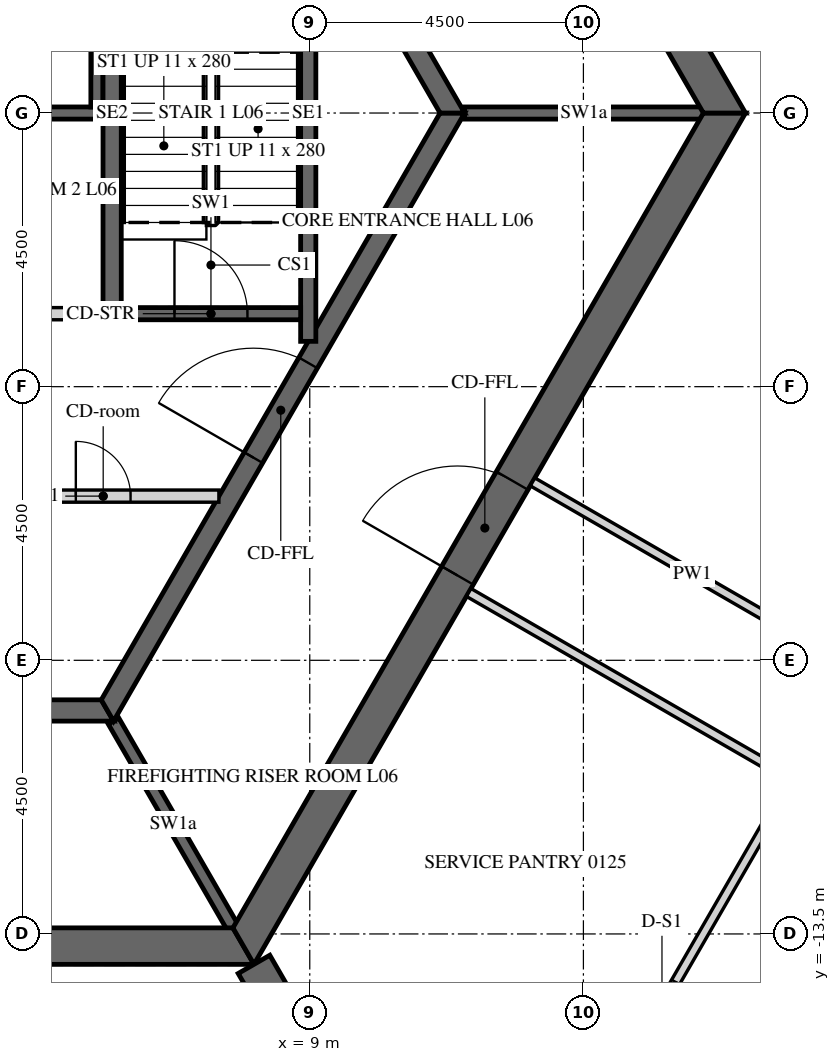
"""IFC4 building model, lengths in metres.
Left out: names, types, materials, properties, quantities, classifications, styles, units other than length and angle.
Written with IfcOpenShell. Run it as: python <this file> out.ifc"""

import sys

from ifc_helpers import new_model, si_unit, direction, frame, frame_2d, origin, place, context, subcontext, project, spatial, polyline, rectangle, outline, extrude, element, fill, save


model = new_model("IFC4")
c1 = context("Model", 3, precision=1e-05, world=origin(), true_north=direction((0.0, 1.0)))
c2 = subcontext(c1, "Body", "Model", "MODEL_VIEW")
j1 = project(units=[si_unit("LENGTHUNIT", "METRE"), si_unit("PLANEANGLEUNIT", "RADIAN")], contexts=[c1])
p1 = place(None, origin())
s1 = spatial("IfcSite", under=j1, at=p1, CompositionType="ELEMENT")
p2 = place(p1, origin())
s2 = spatial("IfcBuilding", under=s1, at=p2, CompositionType="ELEMENT")
p3 = place(p2, frame((0.0, 0.0, 37.5)))
s3 = spatial("IfcBuildingStorey", under=s2, at=p3, CompositionType="ELEMENT", Elevation=37.5)
p4 = place(p3, frame((-7.91, -13.7, -0.15), z_axis=(0.0, 0.0, 1.0), x_axis=(1.0, 0.0, 0.0)))
e1 = element("IfcWall", 1, at=p4, inside=s3, PredefinedType="SHEAR", context=c2, shape_type="SweptSolid", body=[
    extrude(outline(polyline([(-0.173, -0.3), (15.993, -0.3), (15.646, 0.3), (0.173, 0.3), (-0.173, -0.3)])), origin(), (0.0, 0.0, 1.0), 3.9),
])
p5 = place(p4, frame((7.31, 0.0, 0.15)))
e2 = element("IfcOpeningElement", 2, at=p5, cuts=e1, PredefinedType="OPENING", context=c2, shape_type="SweptSolid", body=[
    extrude(rectangle(XDim=1.2, YDim=2.4, at=frame_2d((0.6, 1.2))), frame((0.0, 0.31, 0.0), z_axis=(0.0, -1.0, 0.0), x_axis=(1.0, 0.0, 0.0)), (0.0, 0.0, 1.0), 0.62),
])
p6 = place(p3, frame((7.91, -13.7, -0.15), z_axis=(0.0, 0.0, 1.0), x_axis=(0.499999880136, 0.866025472988, 0.0)))
e3 = element("IfcWall", 3, at=p6, inside=s3, PredefinedType="SHEAR", context=c2, shape_type="SweptSolid", body=[
    extrude(outline(polyline([(-0.173, -0.3), (15.993, -0.3), (15.646, 0.3), (0.173, 0.3), (-0.173, -0.3)])), origin(), (0.0, 0.0, 1.0), 3.9),
])
p7 = place(p6, frame((7.039, 0.0, 0.15)))
e4 = element("IfcOpeningElement", 4, at=p7, cuts=e3, PredefinedType="OPENING", context=c2, shape_type="SweptSolid", body=[
    extrude(rectangle(XDim=1.8, YDim=2.4, at=frame_2d((0.9, 1.2))), frame((0.0, 0.31, 0.0), z_axis=(0.0, -1.0, 0.0), x_axis=(1.0, 0.0, 0.0)), (0.0, 0.0, 1.0), 0.62),
])
p8 = place(p3, frame((15.819, 0.0, -0.15), z_axis=(0.0, 0.0, 1.0), x_axis=(-0.499999880136, 0.866025472988, 0.0)))
e5 = element("IfcWall", 5, at=p8, inside=s3, PredefinedType="SHEAR", context=c2, shape_type="SweptSolid", body=[
    extrude(outline(polyline([(-0.173, -0.3), (15.993, -0.3), (15.646, 0.3), (0.173, 0.3), (-0.173, -0.3)])), origin(), (0.0, 0.0, 1.0), 3.9),
])
p9 = place(p8, frame((6.981, 0.0, 0.15)))
e6 = element("IfcOpeningElement", 6, at=p9, cuts=e5, PredefinedType="OPENING", context=c2, shape_type="SweptSolid", body=[
    extrude(rectangle(XDim=1.8, YDim=2.4, at=frame_2d((0.9, 1.2))), frame((0.0, 0.31, 0.0), z_axis=(0.0, -1.0, 0.0), x_axis=(1.0, 0.0, 0.0)), (0.0, 0.0, 1.0), 0.62),
])
p10 = place(p3, frame((8.083, -14.0, -0.15), z_axis=(0.0, 0.0, 1.0), x_axis=(0.499997680643, -0.866026742862, 0.0)))
e7 = element("IfcWall", 7, at=p10, inside=s3, PredefinedType="SHEAR", context=c2, shape_type="SweptSolid", body=[
    extrude(rectangle(XDim=16.509, YDim=0.6, at=frame_2d((8.254, 0.0))), origin(), (0.0, 0.0, 1.0), 3.9),
])
p11 = place(p10, frame((7.354, 0.0, 0.15)))
e8 = element("IfcOpeningElement", 8, at=p11, cuts=e7, PredefinedType="OPENING", context=c2, shape_type="SweptSolid", body=[
    extrude(rectangle(XDim=1.8, YDim=2.4, at=frame_2d((0.9, 1.2))), frame((0.0, 0.31, 0.0), z_axis=(0.0, -1.0, 0.0), x_axis=(1.0, 0.0, 0.0)), (0.0, 0.0, 1.0), 0.62),
])
p12 = place(p3, frame((-5.673, -9.825, -0.15), z_axis=(0.0, 0.0, 1.0), x_axis=(1.0, 0.0, 0.0)))
e9 = element("IfcWall", 9, at=p12, inside=s3, PredefinedType="SHEAR", context=c2, shape_type="SweptSolid", body=[
    extrude(outline(polyline([(-0.101, -0.175), (11.446, -0.175), (11.244, 0.175), (0.101, 0.175), (-0.101, -0.175)])), origin(), (0.0, 0.0, 1.0), 3.9),
])
p13 = place(p3, frame((5.673, -9.825, -0.15), z_axis=(0.0, 0.0, 1.0), x_axis=(0.499995046907, 0.866028263435, 0.0)))
e10 = element("IfcWall", 10, at=p13, inside=s3, PredefinedType="SHEAR", context=c2, shape_type="SweptSolid", body=[
    extrude(outline(polyline([(-0.101, -0.175), (11.446, -0.175), (11.244, 0.175), (0.101, 0.175), (-0.101, -0.175)])), origin(), (0.0, 0.0, 1.0), 3.9),
])
p14 = place(p13, frame((4.801, 0.0, 0.15)))
e11 = element("IfcOpeningElement", 11, at=p14, cuts=e10, PredefinedType="OPENING", context=c2, shape_type="SweptSolid", body=[
    extrude(rectangle(XDim=1.8, YDim=2.4, at=frame_2d((0.9, 1.2))), frame((0.0, 0.185, 0.0), z_axis=(0.0, -1.0, 0.0), x_axis=(1.0, 0.0, 0.0)), (0.0, 0.0, 1.0), 0.37),
])
p15 = place(p3, frame((11.345, 0.0, -0.15), z_axis=(0.0, 0.0, 1.0), x_axis=(-0.499995046907, 0.866028263435, 0.0)))
e12 = element("IfcWall", 12, at=p15, inside=s3, PredefinedType="SHEAR", context=c2, shape_type="SweptSolid", body=[
    extrude(outline(polyline([(-0.101, -0.175), (11.446, -0.175), (11.244, 0.175), (0.101, 0.175), (-0.101, -0.175)])), origin(), (0.0, 0.0, 1.0), 3.9),
])
p16 = place(p15, frame((4.744, 0.0, 0.15)))
e13 = element("IfcOpeningElement", 13, at=p16, cuts=e12, PredefinedType="OPENING", context=c2, shape_type="SweptSolid", body=[
    extrude(rectangle(XDim=1.8, YDim=2.4, at=frame_2d((0.9, 1.2))), frame((0.0, 0.185, 0.0), z_axis=(0.0, -1.0, 0.0), x_axis=(1.0, 0.0, 0.0)), (0.0, 0.0, 1.0), 0.37),
])
p17 = place(p3, frame((-5.6, 0.0, -0.25), z_axis=(0.0, 0.0, 1.0), x_axis=(1.0, 0.0, 0.0)))
e14 = element("IfcWall", 14, at=p17, inside=s3, PredefinedType="SHEAR", context=c2, shape_type="SweptSolid", body=[
    extrude(rectangle(XDim=11.2, YDim=0.2, at=frame_2d((5.6, 0.0))), origin(), (0.0, 0.0, 1.0), 3.9),
])
p18 = place(p3, frame((5.5, 0.1, -0.25), z_axis=(0.0, 0.0, 1.0), x_axis=(0.0, 1.0, 0.0)))
e15 = element("IfcWall", 15, at=p18, inside=s3, PredefinedType="SHEAR", context=c2, shape_type="SweptSolid", body=[
    extrude(rectangle(XDim=3.1, YDim=0.2, at=frame_2d((1.55, 0.0))), origin(), (0.0, 0.0, 1.0), 3.9),
])
p19 = place(p3, frame((0.1, -3.3, 0.0), z_axis=(0.0, 0.0, 1.0), x_axis=(1.0, 0.0, 0.0)))
e16 = element("IfcWall", 16, at=p19, inside=s3, PredefinedType="PARTITIONING", context=c2, shape_type="SweptSolid", body=[
    extrude(rectangle(XDim=5.5, YDim=0.2, at=frame_2d((2.75, 0.0))), origin(), (0.0, 0.0, 1.0), 3.65),
])
p20 = place(p19, frame((2.3, 0.0, 0.0)))
e17 = element("IfcOpeningElement", 17, at=p20, cuts=e16, PredefinedType="OPENING", context=c2, shape_type="SweptSolid", body=[
    extrude(rectangle(XDim=0.9, YDim=2.1, at=frame_2d((0.45, 1.05))), frame((0.0, 0.11, 0.0), z_axis=(0.0, -1.0, 0.0), x_axis=(1.0, 0.0, 0.0)), (0.0, 0.0, 1.0), 0.22),
])
p21 = place(p3, frame((3.7, -6.3, 0.0), z_axis=(0.0, 0.0, 1.0), x_axis=(1.0, 0.0, 0.0)))
e18 = element("IfcWall", 18, at=p21, inside=s3, PredefinedType="PARTITIONING", context=c2, shape_type="SweptSolid", body=[
    extrude(rectangle(XDim=3.806, YDim=0.2, at=frame_2d((1.903, 0.0))), origin(), (0.0, 0.0, 1.0), 3.65),
])
p22 = place(p21, frame((1.453, 0.0, 0.0)))
e19 = element("IfcOpeningElement", 19, at=p22, cuts=e18, PredefinedType="OPENING", context=c2, shape_type="SweptSolid", body=[
    extrude(rectangle(XDim=0.9, YDim=2.1, at=frame_2d((0.45, 1.05))), frame((0.0, 0.11, 0.0), z_axis=(0.0, -1.0, 0.0), x_axis=(1.0, 0.0, 0.0)), (0.0, 0.0, 1.0), 0.22),
])
p23 = place(p3, frame((11.547, 0.0, -0.15), z_axis=(0.0, 0.0, 1.0), x_axis=(1.0, 0.0, 0.0)))
e20 = element("IfcWall", 20, at=p23, inside=s3, PredefinedType="SHEAR", context=c2, shape_type="SweptSolid", body=[
    extrude(rectangle(XDim=3.926, YDim=0.2, at=frame_2d((1.963, 0.0))), origin(), (0.0, 0.0, 1.0), 3.9),
])
p24 = place(p3, frame((5.773, -10.0, -0.15), z_axis=(0.0, 0.0, 1.0), x_axis=(0.500038251005, -0.86600331843, 0.0)))
e21 = element("IfcWall", 21, at=p24, inside=s3, PredefinedType="SHEAR", context=c2, shape_type="SweptSolid", body=[
    extrude(rectangle(XDim=3.926, YDim=0.2, at=frame_2d((1.963, 0.0))), origin(), (0.0, 0.0, 1.0), 3.9),
])
p25 = place(p3, frame((5.75, -3.4, -0.25), z_axis=(0.0, 0.0, 1.0), x_axis=(0.0, 1.0, 0.0)))
e22 = element("IfcWall", 22, at=p25, inside=s3, PredefinedType="SHEAR", context=c2, shape_type="SweptSolid", body=[
    extrude(rectangle(XDim=6.8, YDim=0.3, at=frame_2d((3.4, 0.0))), origin(), (0.0, 0.0, 1.0), 3.9),
])
p26 = place(p3, frame((8.975, -3.755, -0.25), z_axis=(0.0, 0.0, 1.0), x_axis=(0.0, 1.0, 0.0)))
e23 = element("IfcWall", 23, at=p26, inside=s3, PredefinedType="SHEAR", context=c2, shape_type="SweptSolid", body=[
    extrude(rectangle(XDim=7.51, YDim=0.25, at=frame_2d((3.755, 0.0))), origin(), (0.0, 0.0, 1.0), 3.9),
])
p27 = place(p3, frame((5.9, -3.3, -0.25), z_axis=(0.0, 0.0, 1.0), x_axis=(1.0, 0.0, 0.0)))
e24 = element("IfcWall", 24, at=p27, inside=s3, PredefinedType="SHEAR", context=c2, shape_type="SweptSolid", body=[
    extrude(rectangle(XDim=2.95, YDim=0.2, at=frame_2d((1.475, 0.0))), origin(), (0.0, 0.0, 1.0), 3.9),
])
p28 = place(p27, frame((0.875, 0.0, 0.25)))
e25 = element("IfcOpeningElement", 25, at=p28, cuts=e24, PredefinedType="OPENING", context=c2, shape_type="SweptSolid", body=[
    extrude(rectangle(XDim=1.2, YDim=2.4, at=frame_2d((0.6, 1.2))), frame((0.0, 0.11, 0.0), z_axis=(0.0, -1.0, 0.0), x_axis=(1.0, 0.0, 0.0)), (0.0, 0.0, 1.0), 0.22),
])
p29 = place(p3, frame((13.928, -19.775, 0.0), z_axis=(0.0, 0.0, 1.0), x_axis=(0.50000450071, 0.866022805283, 0.0)))
e26 = element("IfcWall", 26, at=p29, inside=s3, PredefinedType="PARTITIONING", context=c2, shape_type="SweptSolid", body=[
    extrude(rectangle(XDim=23.877, YDim=0.15, at=frame_2d((11.938, 0.0))), origin(), (0.0, 0.0, 1.0), 2.988),
])
p30 = place(p29, frame((8.573, 0.0, 0.0)))
e27 = element("IfcOpeningElement", 27, at=p30, cuts=e26, PredefinedType="OPENING", context=c2, shape_type="SweptSolid", body=[
    extrude(rectangle(XDim=1.0, YDim=2.1, at=frame_2d((0.5, 1.05))), frame((0.0, 0.085, 0.0), z_axis=(0.0, -1.0, 0.0), x_axis=(1.0, 0.0, 0.0)), (0.0, 0.0, 1.0), 0.17),
])
p31 = place(p29, frame((13.022, 0.0, 0.0)))
e28 = element("IfcOpeningElement", 28, at=p31, cuts=e26, PredefinedType="OPENING", context=c2, shape_type="SweptSolid", body=[
    extrude(rectangle(XDim=1.0, YDim=2.1, at=frame_2d((0.5, 1.05))), frame((0.0, 0.085, 0.0), z_axis=(0.0, -1.0, 0.0), x_axis=(1.0, 0.0, 0.0)), (0.0, 0.0, 1.0), 0.17),
])
p32 = place(p29, frame((21.925, 0.0, 0.0)))
e29 = element("IfcOpeningElement", 29, at=p32, cuts=e26, PredefinedType="OPENING", context=c2, shape_type="SweptSolid", body=[
    extrude(rectangle(XDim=1.0, YDim=2.1, at=frame_2d((0.5, 1.05))), frame((0.0, 0.085, 0.0), z_axis=(0.0, -1.0, 0.0), x_axis=(1.0, 0.0, 0.0)), (0.0, 0.0, 1.0), 0.17),
])
p33 = place(p3, frame((25.821, 0.972, 0.0), z_axis=(0.0, 0.0, 1.0), x_axis=(-0.559193816298, 0.829036956845, 0.0)))
e30 = element("IfcWall", 30, at=p33, inside=s3, PredefinedType="PARTITIONING", context=c2, shape_type="SweptSolid", body=[
    extrude(rectangle(XDim=22.002, YDim=0.15, at=frame_2d((11.001, 0.0))), origin(), (0.0, 0.0, 1.0), 2.988),
])
p34 = place(p33, frame((0.869, 0.0, 0.0)))
e31 = element("IfcOpeningElement", 31, at=p34, cuts=e30, PredefinedType="OPENING", context=c2, shape_type="SweptSolid", body=[
    extrude(rectangle(XDim=1.0, YDim=2.1, at=frame_2d((0.5, 1.05))), frame((0.0, 0.085, 0.0), z_axis=(0.0, -1.0, 0.0), x_axis=(1.0, 0.0, 0.0)), (0.0, 0.0, 1.0), 0.17),
])
p35 = place(p33, frame((10.721, 0.0, 0.0)))
e32 = element("IfcOpeningElement", 32, at=p35, cuts=e30, PredefinedType="OPENING", context=c2, shape_type="SweptSolid", body=[
    extrude(rectangle(XDim=1.0, YDim=2.1, at=frame_2d((0.5, 1.05))), frame((0.0, 0.085, 0.0), z_axis=(0.0, -1.0, 0.0), x_axis=(1.0, 0.0, 0.0)), (0.0, 0.0, 1.0), 0.17),
])
p36 = place(p3, frame((17.925, -9.103, 0.0), z_axis=(0.0, 0.0, 1.0), x_axis=(-0.866013586754, 0.500020467139, 0.0)))
e33 = element("IfcWall", 33, at=p36, inside=s3, PredefinedType="PARTITIONING", context=c2, shape_type="SweptSolid", body=[
    extrude(rectangle(XDim=6.075, YDim=0.15, at=frame_2d((3.038, 0.0))), origin(), (0.0, 0.0, 1.0), 2.988),
])
p37 = place(p3, frame((11.614, -7.884, 0.0), z_axis=(0.0, 0.0, 1.0), x_axis=(0.866033542371, -0.499985903289, 0.0)))
e34 = element("IfcWall", 34, at=p37, inside=s3, PredefinedType="PARTITIONING", context=c2, shape_type="SweptSolid", body=[
    extrude(rectangle(XDim=6.15, YDim=0.15, at=frame_2d((3.075, 0.0))), origin(), (0.0, 0.0, 1.0), 2.988),
])
p38 = place(p3, frame((16.902, -11.024, 0.0), z_axis=(0.0, 0.0, 1.0), x_axis=(-0.499999527968, -0.866025676312, 0.0)))
e35 = element("IfcWall", 35, at=p38, inside=s3, PredefinedType="PARTITIONING", context=c2, shape_type="SweptSolid", body=[
    extrude(rectangle(XDim=8.441, YDim=0.15, at=frame_2d((4.22, 0.0))), origin(), (0.0, 0.0, 1.0), 2.988),
])
p39 = place(p38, frame((3.771, 0.0, 0.0)))
e36 = element("IfcOpeningElement", 36, at=p39, cuts=e35, PredefinedType="OPENING", context=c2, shape_type="SweptSolid", body=[
    extrude(rectangle(XDim=0.9, YDim=2.1, at=frame_2d((0.45, 1.05))), frame((0.0, 0.085, 0.0), z_axis=(0.0, -1.0, 0.0), x_axis=(1.0, 0.0, 0.0)), (0.0, 0.0, 1.0), 0.17),
])
p40 = place(p7, origin())
e37 = element("IfcDoor", 37, at=p40, inside=s3, OperationType="DOUBLE_DOOR_SINGLE_SWING", PredefinedType="DOOR", context=c2, shape_type="SweptSolid", body=[
    extrude(rectangle(XDim=1.8, YDim=2.4, at=frame_2d((0.9, 1.2))), frame((0.0, 0.025, 0.0), z_axis=(0.0, -1.0, 0.0), x_axis=(1.0, 0.0, 0.0)), (0.0, 0.0, 1.0), 0.05),
])
fill(e4, e37)
p41 = place(p14, origin())
e38 = element("IfcDoor", 38, at=p41, inside=s3, OperationType="DOUBLE_DOOR_SINGLE_SWING", PredefinedType="DOOR", context=c2, shape_type="SweptSolid", body=[
    extrude(rectangle(XDim=1.8, YDim=2.4, at=frame_2d((0.9, 1.2))), frame((0.0, 0.025, 0.0), z_axis=(0.0, -1.0, 0.0), x_axis=(1.0, 0.0, 0.0)), (0.0, 0.0, 1.0), 0.05),
])
fill(e11, e38)
p42 = place(p22, origin())
e39 = element("IfcDoor", 39, at=p42, inside=s3, OperationType="SINGLE_SWING_LEFT", PredefinedType="DOOR", context=c2, shape_type="SweptSolid", body=[
    extrude(rectangle(XDim=0.9, YDim=2.1, at=frame_2d((0.45, 1.05))), frame((0.0, 0.025, 0.0), z_axis=(0.0, -1.0, 0.0), x_axis=(1.0, 0.0, 0.0)), (0.0, 0.0, 1.0), 0.05),
])
fill(e19, e39)
p43 = place(p28, origin())
e40 = element("IfcDoor", 40, at=p43, inside=s3, OperationType="SINGLE_SWING_LEFT", PredefinedType="DOOR", context=c2, shape_type="SweptSolid", body=[
    extrude(rectangle(XDim=1.2, YDim=2.4, at=frame_2d((0.6, 1.2))), frame((0.0, 0.025, 0.0), z_axis=(0.0, -1.0, 0.0), x_axis=(1.0, 0.0, 0.0)), (0.0, 0.0, 1.0), 0.05),
])
fill(e25, e40)
p44 = place(p39, origin())
e41 = element("IfcDoor", 41, at=p44, inside=s3, OperationType="SINGLE_SWING_RIGHT", PredefinedType="DOOR", context=c2, shape_type="SweptSolid", body=[
    extrude(rectangle(XDim=0.9, YDim=2.1, at=frame_2d((0.45, 1.05))), frame((0.0, 0.025, 0.0), z_axis=(0.0, -1.0, 0.0), x_axis=(1.0, 0.0, 0.0)), (0.0, 0.0, 1.0), 0.05),
])
fill(e36, e41)
save(model, sys.argv[1])
